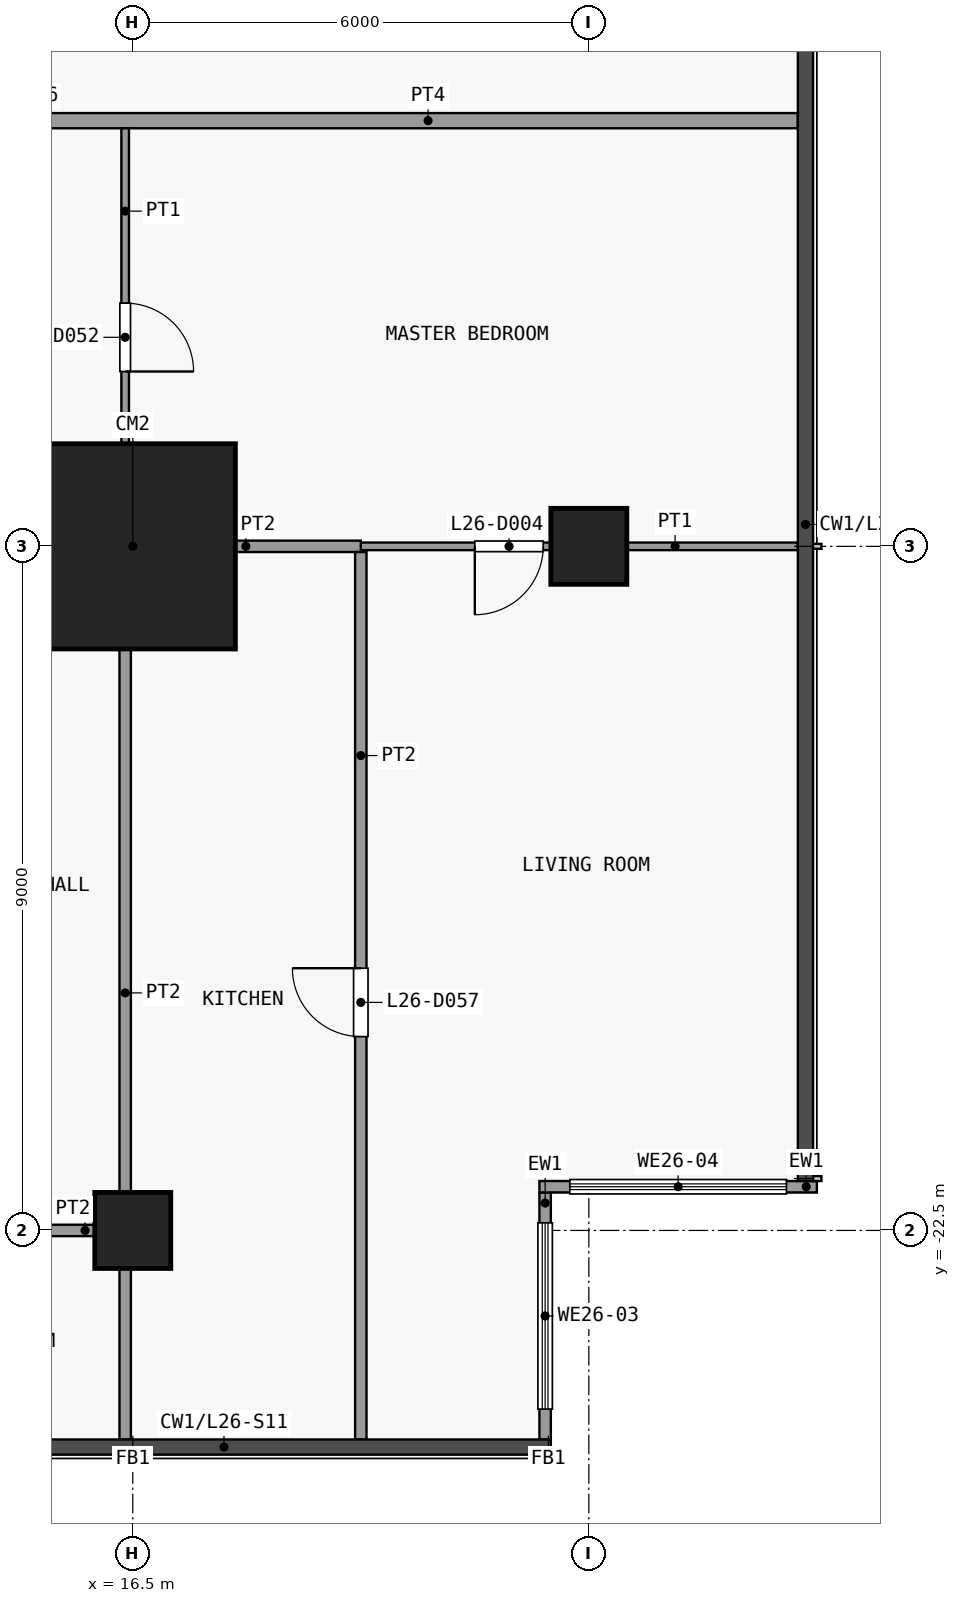
"""IFC4 building model, lengths in metres.
Left out: names, types, materials, properties, quantities, classifications, styles, units other than length and angle.
Written with IfcOpenShell. Run it as: python <this file> out.ifc"""

import sys

from ifc_helpers import new_model, si_unit, direction, frame, frame_2d, origin, origin_2d, place, context, subcontext, project, spatial, rectangle, extrude, element, fill, save


model = new_model("IFC4")
c1 = context("Model", 3, precision=1e-05, world=origin(), true_north=direction((0.0, 1.0)))
c2 = subcontext(c1, "Body", "Model", "MODEL_VIEW")
j1 = project(units=[si_unit("LENGTHUNIT", "METRE"), si_unit("PLANEANGLEUNIT", "RADIAN")], contexts=[c1])
p1 = place(None, origin())
s1 = spatial("IfcSite", under=j1, at=p1, CompositionType="ELEMENT")
p2 = place(p1, origin())
s2 = spatial("IfcBuilding", under=s1, at=p2, CompositionType="ELEMENT")
p3 = place(p2, frame((0.0, 0.0, 106.3)))
s3 = spatial("IfcBuildingStorey", under=s2, at=p3, CompositionType="ELEMENT", Elevation=106.3)
p4 = place(p3, frame((16.5, -22.5, 0.0), z_axis=(0.0, 0.0, 1.0), x_axis=(1.0, 0.0, 0.0)))
e1 = element("IfcColumn", 1, at=p4, inside=s3, PredefinedType="COLUMN", context=c2, shape_type="SweptSolid", body=[
    extrude(rectangle(XDim=1.0, YDim=1.0, at=origin_2d()), origin(), (0.0, 0.0, 1.0), 3.6),
])
p5 = place(p3, frame((16.5, -13.5, 0.0), z_axis=(0.0, 0.0, 1.0), x_axis=(1.0, 0.0, 0.0)))
e2 = element("IfcColumn", 2, at=p5, inside=s3, PredefinedType="COLUMN", context=c2, shape_type="SweptSolid", body=[
    extrude(rectangle(XDim=2.7, YDim=2.7, at=origin_2d()), origin(), (0.0, 0.0, 1.0), 3.6),
])
p6 = place(p3, frame((22.5, -13.5, 0.0), z_axis=(0.0, 0.0, 1.0), x_axis=(1.0, 0.0, 0.0)))
e3 = element("IfcColumn", 3, at=p6, inside=s3, PredefinedType="COLUMN", context=c2, shape_type="SweptSolid", body=[
    extrude(rectangle(XDim=1.0, YDim=1.0, at=origin_2d()), origin(), (0.0, 0.0, 1.0), 3.6),
])
p7 = place(p3, frame((21.925, -22.0, 0.0), z_axis=(0.0, 0.0, 1.0), x_axis=(0.0, -1.0, 0.0)))
e4 = element("IfcWall", 4, at=p7, inside=s3, PredefinedType="SOLIDWALL", context=c2, shape_type="SweptSolid", body=[
    extrude(rectangle(XDim=3.25, YDim=0.15, at=frame_2d((1.625, 0.0))), origin(), (0.0, 0.0, 1.0), 3.3),
])
p8 = place(p7, frame((0.4, 0.0, 0.9)))
e5 = element("IfcOpeningElement", 5, at=p8, cuts=e4, PredefinedType="OPENING", context=c2, shape_type="SweptSolid", body=[
    extrude(rectangle(XDim=2.45, YDim=2.4, at=frame_2d((1.225, 1.2))), frame((0.0, 0.085, 0.0), z_axis=(0.0, -1.0, 0.0), x_axis=(1.0, 0.0, 0.0)), (0.0, 0.0, 1.0), 0.17),
])
p9 = place(p3, frame((25.5, -21.925, 0.0), z_axis=(0.0, 0.0, 1.0), x_axis=(-1.0, 0.0, 0.0)))
e6 = element("IfcWall", 6, at=p9, inside=s3, PredefinedType="SOLIDWALL", context=c2, shape_type="SweptSolid", body=[
    extrude(rectangle(XDim=3.65, YDim=0.15, at=frame_2d((1.825, 0.0))), origin(), (0.0, 0.0, 1.0), 3.3),
])
p10 = place(p9, frame((0.4, 0.0, 0.9)))
e7 = element("IfcOpeningElement", 7, at=p10, cuts=e6, PredefinedType="OPENING", context=c2, shape_type="SweptSolid", body=[
    extrude(rectangle(XDim=2.85, YDim=2.4, at=frame_2d((1.425, 1.2))), frame((0.0, 0.085, 0.0), z_axis=(0.0, -1.0, 0.0), x_axis=(1.0, 0.0, 0.0)), (0.0, 0.0, 1.0), 0.17),
])
p11 = place(p3, frame((13.4, -22.5, 0.0), z_axis=(0.0, 0.0, 1.0), x_axis=(1.0, 0.0, 0.0)))
e8 = element("IfcWall", 8, at=p11, inside=s3, PredefinedType="PARTITIONING", context=c2, shape_type="SweptSolid", body=[
    extrude(rectangle(XDim=2.925, YDim=0.15, at=frame_2d((1.462, 0.0))), origin(), (0.0, 0.0, 1.0), 3.3),
])
p12 = place(p11, frame((1.0, 0.0, 0.0)))
e9 = element("IfcOpeningElement", 9, at=p12, cuts=e8, PredefinedType="OPENING", context=c2, shape_type="SweptSolid", body=[
    extrude(rectangle(XDim=0.9, YDim=2.1, at=frame_2d((0.45, 1.05))), frame((0.0, 0.085, 0.0), z_axis=(0.0, -1.0, 0.0), x_axis=(1.0, 0.0, 0.0)), (0.0, 0.0, 1.0), 0.17),
])
p13 = place(p3, frame((19.5, -13.5, 0.0), z_axis=(0.0, 0.0, 1.0), x_axis=(1.0, 0.0, 0.0)))
e10 = element("IfcWall", 10, at=p13, inside=s3, PredefinedType="PARTITIONING", context=c2, shape_type="SweptSolid", body=[
    extrude(rectangle(XDim=5.75, YDim=0.1, at=frame_2d((2.875, 0.0))), origin(), (0.0, 0.0, 1.0), 3.3),
])
p14 = place(p13, frame((1.5, 0.0, 0.0)))
e11 = element("IfcOpeningElement", 11, at=p14, cuts=e10, PredefinedType="OPENING", context=c2, shape_type="SweptSolid", body=[
    extrude(rectangle(XDim=0.9, YDim=2.1, at=frame_2d((0.45, 1.05))), frame((0.0, 0.06, 0.0), z_axis=(0.0, -1.0, 0.0), x_axis=(1.0, 0.0, 0.0)), (0.0, 0.0, 1.0), 0.12),
])
p15 = place(p3, frame((16.475, -13.5, 0.0), z_axis=(0.0, 0.0, 1.0), x_axis=(1.0, 0.0, 0.0)))
e12 = element("IfcWall", 12, at=p15, inside=s3, PredefinedType="PARTITIONING", context=c2, shape_type="SweptSolid", body=[
    extrude(rectangle(XDim=3.025, YDim=0.15, at=frame_2d((1.512, 0.0))), origin(), (0.0, 0.0, 1.0), 3.3),
])
p16 = place(p3, frame((13.4, -7.9, 0.0), z_axis=(0.0, 0.0, 1.0), x_axis=(1.0, 0.0, 0.0)))
e13 = element("IfcWall", 13, at=p16, inside=s3, PredefinedType="PARTITIONING", context=c2, shape_type="SweptSolid", body=[
    extrude(rectangle(XDim=11.85, YDim=0.2, at=frame_2d((5.925, 0.0))), origin(), (0.0, 0.0, 1.0), 3.3),
])
p17 = place(p16, frame((1.0, 0.0, 0.0)))
e14 = element("IfcOpeningElement", 14, at=p17, cuts=e13, PredefinedType="OPENING", context=c2, shape_type="SweptSolid", body=[
    extrude(rectangle(XDim=1.0, YDim=2.1, at=frame_2d((0.5, 1.05))), frame((0.0, 0.11, 0.0), z_axis=(0.0, -1.0, 0.0), x_axis=(1.0, 0.0, 0.0)), (0.0, 0.0, 1.0), 0.22),
])
p18 = place(p3, frame((16.4, -13.5, 0.0), z_axis=(0.0, 0.0, 1.0), x_axis=(0.0, 1.0, 0.0)))
e15 = element("IfcWall", 15, at=p18, inside=s3, PredefinedType="PARTITIONING", context=c2, shape_type="SweptSolid", body=[
    extrude(rectangle(XDim=5.5, YDim=0.1, at=frame_2d((2.75, 0.0))), origin(), (0.0, 0.0, 1.0), 3.3),
])
p19 = place(p18, frame((2.3, 0.0, 0.0)))
e16 = element("IfcOpeningElement", 16, at=p19, cuts=e15, PredefinedType="OPENING", context=c2, shape_type="SweptSolid", body=[
    extrude(rectangle(XDim=0.9, YDim=2.1, at=frame_2d((0.45, 1.05))), frame((0.0, 0.06, 0.0), z_axis=(0.0, -1.0, 0.0), x_axis=(1.0, 0.0, 0.0)), (0.0, 0.0, 1.0), 0.12),
])
p20 = place(p3, frame((16.4, -25.25, 0.0), z_axis=(0.0, 0.0, 1.0), x_axis=(0.0, 1.0, 0.0)))
e17 = element("IfcWall", 17, at=p20, inside=s3, PredefinedType="PARTITIONING", context=c2, shape_type="SweptSolid", body=[
    extrude(rectangle(XDim=11.75, YDim=0.15, at=frame_2d((5.875, 0.0))), origin(), (0.0, 0.0, 1.0), 3.3),
])
p21 = place(p3, frame((19.5, -25.25, 0.0), z_axis=(0.0, 0.0, 1.0), x_axis=(0.0, 1.0, 0.0)))
e18 = element("IfcWall", 18, at=p21, inside=s3, PredefinedType="PARTITIONING", context=c2, shape_type="SweptSolid", body=[
    extrude(rectangle(XDim=11.675, YDim=0.15, at=frame_2d((5.837, 0.0))), origin(), (0.0, 0.0, 1.0), 3.3),
])
p22 = place(p21, frame((5.3, 0.0, 0.0)))
e19 = element("IfcOpeningElement", 19, at=p22, cuts=e18, PredefinedType="OPENING", context=c2, shape_type="SweptSolid", body=[
    extrude(rectangle(XDim=0.9, YDim=2.1, at=frame_2d((0.45, 1.05))), frame((0.0, 0.085, 0.0), z_axis=(0.0, -1.0, 0.0), x_axis=(1.0, 0.0, 0.0)), (0.0, 0.0, 1.0), 0.17),
])
p23 = place(p8, origin())
e20 = element("IfcWindow", 20, at=p23, inside=s3, PartitioningType="SINGLE_PANEL", PredefinedType="WINDOW", context=c2, shape_type="SweptSolid", body=[
    extrude(rectangle(XDim=2.45, YDim=2.4, at=frame_2d((1.225, 1.2))), frame((0.0, 0.03, 0.0), z_axis=(0.0, -1.0, 0.0), x_axis=(1.0, 0.0, 0.0)), (0.0, 0.0, 1.0), 0.06),
])
fill(e5, e20)
p24 = place(p10, origin())
e21 = element("IfcWindow", 21, at=p24, inside=s3, PartitioningType="SINGLE_PANEL", PredefinedType="WINDOW", context=c2, shape_type="SweptSolid", body=[
    extrude(rectangle(XDim=2.85, YDim=2.4, at=frame_2d((1.425, 1.2))), frame((0.0, 0.03, 0.0), z_axis=(0.0, -1.0, 0.0), x_axis=(1.0, 0.0, 0.0)), (0.0, 0.0, 1.0), 0.06),
])
fill(e7, e21)
p25 = place(p14, origin())
e22 = element("IfcDoor", 22, at=p25, inside=s3, OperationType="SINGLE_SWING_LEFT", PredefinedType="DOOR", context=c2, shape_type="SweptSolid", body=[
    extrude(rectangle(XDim=0.9, YDim=2.1, at=frame_2d((0.45, 1.05))), frame((0.0, 0.025, 0.0), z_axis=(0.0, -1.0, 0.0), x_axis=(1.0, 0.0, 0.0)), (0.0, 0.0, 1.0), 0.05),
])
fill(e11, e22)
p26 = place(p19, origin())
e23 = element("IfcDoor", 23, at=p26, inside=s3, OperationType="SINGLE_SWING_LEFT", PredefinedType="DOOR", context=c2, shape_type="SweptSolid", body=[
    extrude(rectangle(XDim=0.9, YDim=2.1, at=frame_2d((0.45, 1.05))), frame((0.0, 0.025, 0.0), z_axis=(0.0, -1.0, 0.0), x_axis=(1.0, 0.0, 0.0)), (0.0, 0.0, 1.0), 0.05),
])
fill(e16, e23)
p27 = place(p22, origin())
e24 = element("IfcDoor", 24, at=p27, inside=s3, OperationType="SINGLE_SWING_LEFT", PredefinedType="DOOR", context=c2, shape_type="SweptSolid", body=[
    extrude(rectangle(XDim=0.9, YDim=2.1, at=frame_2d((0.45, 1.05))), frame((0.0, 0.025, 0.0), z_axis=(0.0, -1.0, 0.0), x_axis=(1.0, 0.0, 0.0)), (0.0, 0.0, 1.0), 0.05),
])
fill(e19, e24)
save(model, sys.argv[1])
